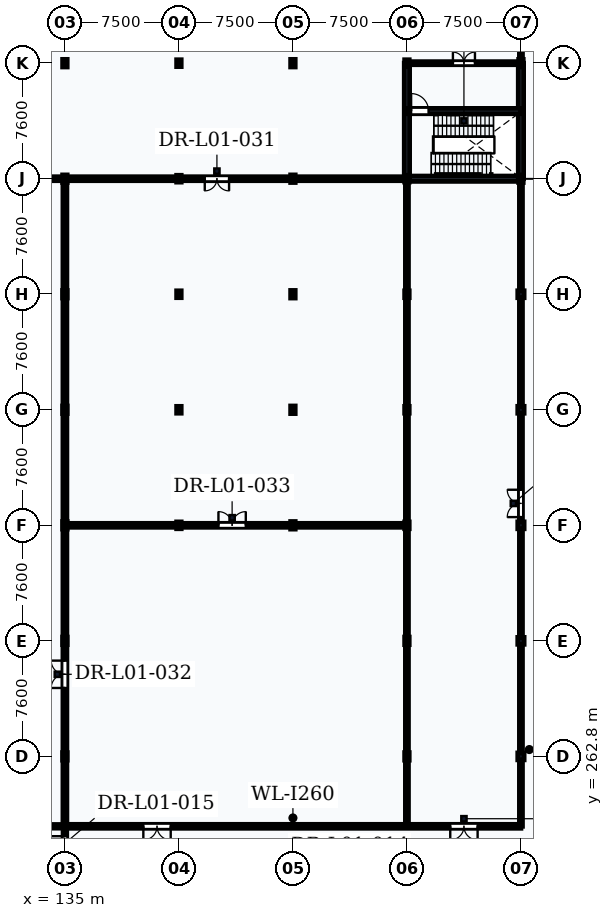
"""IFC4 building model, lengths in metres.
Left out: names, types, materials, properties, quantities, classifications, styles, units other than length and angle.
Written with IfcOpenShell. Run it as: python <this file> out.ifc"""

import sys

from ifc_helpers import new_model, si_unit, direction, frame, frame_2d, origin, origin_2d, place, context, subcontext, project, spatial, rectangle, i_section, extrude, element, fill, save


model = new_model("IFC4")
c1 = context("Model", 3, precision=1e-05, world=origin(), true_north=direction((0.0, 1.0)))
c2 = subcontext(c1, "Body", "Model", "MODEL_VIEW")
j1 = project(units=[si_unit("LENGTHUNIT", "METRE"), si_unit("PLANEANGLEUNIT", "RADIAN")], contexts=[c1])
p1 = place(None, origin())
s1 = spatial("IfcSite", under=j1, at=p1, CompositionType="ELEMENT")
p2 = place(p1, origin())
s2 = spatial("IfcBuilding", under=s1, at=p2, CompositionType="ELEMENT")
p3 = place(p2, origin())
s3 = spatial("IfcBuildingStorey", under=s2, at=p3, CompositionType="ELEMENT", Elevation=0.0)
for number, where, z_axis, x_axis in (
    (1, (135.0, 262.8, 0.0), (0.0, 0.0, 1.0), (1.0, 0.0, 0.0)),
    (2, (135.0, 270.4, 0.0), (0.0, 0.0, 1.0), (1.0, 0.0, 0.0)),
    (3, (135.0, 278.0, 0.0), (0.0, 0.0, 1.0), (1.0, 0.0, 0.0)),
    (4, (135.0, 285.6, 0.0), (0.0, 0.0, 1.0), (1.0, 0.0, 0.0)),
    (5, (135.0, 293.2, 0.0), (0.0, 0.0, 1.0), (1.0, 0.0, 0.0)),
    (6, (135.0, 300.8, 0.0), (0.0, 0.0, 1.0), (1.0, 0.0, 0.0)),
    (7, (135.0, 308.4, 0.0), (0.0, 0.0, 1.0), (1.0, 0.0, 0.0)),
):
    element("IfcColumn", number, at=place(p3, frame(where, z_axis=z_axis, x_axis=x_axis)), inside=s3, PredefinedType="COLUMN", context=c2, shape_type="SweptSolid", body=[
        extrude(i_section(OverallWidth=0.3, OverallDepth=0.5, WebThickness=0.014, FlangeThickness=0.028, FilletRadius=0.027, at=origin_2d()), origin(), (0.0, 0.0, 1.0), 5.4),
    ])
for number, where, z_axis, x_axis in (
    (8, (142.5, 278.0, 0.0), (0.0, 0.0, 1.0), (1.0, 0.0, 0.0)),
    (9, (142.5, 285.6, 0.0), (0.0, 0.0, 1.0), (1.0, 0.0, 0.0)),
    (10, (142.5, 293.2, 0.0), (0.0, 0.0, 1.0), (1.0, 0.0, 0.0)),
    (11, (142.5, 300.8, 0.0), (0.0, 0.0, 1.0), (1.0, 0.0, 0.0)),
    (12, (142.5, 308.4, 0.0), (0.0, 0.0, 1.0), (1.0, 0.0, 0.0)),
):
    element("IfcColumn", number, at=place(p3, frame(where, z_axis=z_axis, x_axis=x_axis)), inside=s3, PredefinedType="COLUMN", context=c2, shape_type="SweptSolid", body=[
        extrude(i_section(OverallWidth=0.3, OverallDepth=0.45, WebThickness=0.014, FlangeThickness=0.026, FilletRadius=0.027, at=origin_2d()), origin(), (0.0, 0.0, 1.0), 5.4),
    ])
for number, where, z_axis, x_axis in (
    (13, (150.0, 278.0, 0.0), (0.0, 0.0, 1.0), (1.0, 0.0, 0.0)),
    (14, (150.0, 285.6, 0.0), (0.0, 0.0, 1.0), (1.0, 0.0, 0.0)),
    (15, (150.0, 293.2, 0.0), (0.0, 0.0, 1.0), (1.0, 0.0, 0.0)),
    (16, (150.0, 300.8, 0.0), (0.0, 0.0, 1.0), (1.0, 0.0, 0.0)),
    (17, (150.0, 308.4, 0.0), (0.0, 0.0, 1.0), (1.0, 0.0, 0.0)),
    (18, (157.5, 262.8, 0.0), (0.0, 0.0, 1.0), (1.0, 0.0, 0.0)),
    (19, (157.5, 270.4, 0.0), (0.0, 0.0, 1.0), (1.0, 0.0, 0.0)),
):
    element("IfcColumn", number, at=place(p3, frame(where, z_axis=z_axis, x_axis=x_axis)), inside=s3, PredefinedType="COLUMN", context=c2, shape_type="SweptSolid", body=[
        extrude(i_section(OverallWidth=0.3, OverallDepth=0.5, WebThickness=0.014, FlangeThickness=0.028, FilletRadius=0.027, at=origin_2d()), origin(), (0.0, 0.0, 1.0), 5.4),
    ])
for number, where, z_axis, x_axis in (
    (20, (157.5, 278.0, 0.0), (0.0, 0.0, 1.0), (1.0, 0.0, 0.0)),
    (21, (157.5, 285.6, 0.0), (0.0, 0.0, 1.0), (1.0, 0.0, 0.0)),
    (22, (157.5, 293.2, 0.0), (0.0, 0.0, 1.0), (1.0, 0.0, 0.0)),
    (23, (157.5, 300.8, 0.0), (0.0, 0.0, 1.0), (1.0, 0.0, 0.0)),
    (24, (157.5, 308.4, 0.0), (0.0, 0.0, 1.0), (1.0, 0.0, 0.0)),
):
    element("IfcColumn", number, at=place(p3, frame(where, z_axis=z_axis, x_axis=x_axis)), inside=s3, PredefinedType="COLUMN", context=c2, shape_type="SweptSolid", body=[
        extrude(i_section(OverallWidth=0.3, OverallDepth=0.45, WebThickness=0.014, FlangeThickness=0.026, FilletRadius=0.027, at=origin_2d()), origin(), (0.0, 0.0, 1.0), 5.4),
    ])
for number, where, z_axis, x_axis in (
    (25, (165.0, 262.8, 0.0), (0.0, 0.0, 1.0), (1.0, 0.0, 0.0)),
    (26, (165.0, 270.4, 0.0), (0.0, 0.0, 1.0), (1.0, 0.0, 0.0)),
    (27, (165.0, 278.0, 0.0), (0.0, 0.0, 1.0), (1.0, 0.0, 0.0)),
    (28, (165.0, 285.6, 0.0), (0.0, 0.0, 1.0), (1.0, 0.0, 0.0)),
    (29, (165.0, 293.2, 0.0), (0.0, 0.0, 1.0), (1.0, 0.0, 0.0)),
):
    element("IfcColumn", number, at=place(p3, frame(where, z_axis=z_axis, x_axis=x_axis)), inside=s3, PredefinedType="COLUMN", context=c2, shape_type="SweptSolid", body=[
        extrude(i_section(OverallWidth=0.418, OverallDepth=0.455, WebThickness=0.042, FlangeThickness=0.068, FilletRadius=0.015, at=origin_2d()), origin(), (0.0, 0.0, 1.0), 5.4),
    ])
for number, where, z_axis, x_axis in (
    (30, (165.0, 300.8, 0.0), (0.0, 0.0, 1.0), (1.0, 0.0, 0.0)),
    (31, (165.0, 308.4, 0.0), (0.0, 0.0, 1.0), (1.0, 0.0, 0.0)),
):
    element("IfcColumn", number, at=place(p3, frame(where, z_axis=z_axis, x_axis=x_axis)), inside=s3, PredefinedType="COLUMN", context=c2, shape_type="SweptSolid", body=[
        extrude(i_section(OverallWidth=0.3, OverallDepth=0.5, WebThickness=0.014, FlangeThickness=0.028, FilletRadius=0.027, at=origin_2d()), origin(), (0.0, 0.0, 1.0), 5.4),
    ])
p4 = place(p3, frame((157.5, 300.8, 0.0), z_axis=(0.0, 0.0, 1.0), x_axis=(1.0, 0.0, 0.0)))
e32 = element("IfcWall", 32, at=p4, inside=s3, PredefinedType="SHEAR", context=c2, shape_type="SweptSolid", body=[
    extrude(rectangle(XDim=7.5, YDim=0.35, at=frame_2d((3.75, 0.0))), origin(), (0.0, 0.0, 1.0), 5.14),
])
for number, where, z_axis, x_axis in (
    (33, (157.5, 300.8, 0.0), (0.0, 0.0, 1.0), (0.0, 1.0, 0.0)),
    (34, (165.0, 300.8, 0.0), (0.0, 0.0, 1.0), (0.0, 1.0, 0.0)),
):
    element("IfcWall", number, at=place(p3, frame(where, z_axis=z_axis, x_axis=x_axis)), inside=s3, PredefinedType="SHEAR", context=c2, shape_type="SweptSolid", body=[
        extrude(rectangle(XDim=7.6, YDim=0.35, at=frame_2d((3.8, 0.0))), origin(), (0.0, 0.0, 1.0), 5.14),
    ])
p5 = place(p3, frame((157.5, 305.25, 0.0), z_axis=(0.0, 0.0, 1.0), x_axis=(1.0, 0.0, 0.0)))
e35 = element("IfcWall", 35, at=p5, inside=s3, PredefinedType="SHEAR", context=c2, shape_type="SweptSolid", body=[
    extrude(rectangle(XDim=7.5, YDim=0.35, at=frame_2d((3.75, 0.0))), origin(), (0.0, 0.0, 1.0), 5.14),
])
p6 = place(p5, frame((0.275, 0.0, 0.0)))
e36 = element("IfcOpeningElement", 36, at=p6, cuts=e35, PredefinedType="OPENING", context=c2, shape_type="SweptSolid", body=[
    extrude(rectangle(XDim=1.15, YDim=2.15, at=frame_2d((0.575, 1.075))), frame((0.0, 0.19, 0.0), z_axis=(0.0, -1.0, 0.0), x_axis=(1.0, 0.0, 0.0)), (0.0, 0.0, 1.0), 0.38),
])
p7 = place(p3, frame((157.5, 308.4, 0.0), z_axis=(0.0, 0.0, 1.0), x_axis=(1.0, 0.0, 0.0)))
e37 = element("IfcWall", 37, at=p7, inside=s3, PredefinedType="PARTITIONING", context=c2, shape_type="SweptSolid", body=[
    extrude(rectangle(XDim=7.5, YDim=0.2, at=frame_2d((3.75, 0.0))), origin(), (0.0, 0.0, 1.0), 4.778),
])
p8 = place(p7, frame((3.025, 0.0, 0.0)))
e38 = element("IfcOpeningElement", 38, at=p8, cuts=e37, PredefinedType="OPENING", context=c2, shape_type="SweptSolid", body=[
    extrude(rectangle(XDim=1.45, YDim=2.2, at=frame_2d((0.725, 1.1))), frame((0.0, 0.115, 0.0), z_axis=(0.0, -1.0, 0.0), x_axis=(1.0, 0.0, 0.0)), (0.0, 0.0, 1.0), 0.23),
])
p9 = place(p3, frame((135.0, 240.0, 0.0), z_axis=(0.0, 0.0, 1.0), x_axis=(0.0, 1.0, 0.0)))
e39 = element("IfcWall", 39, at=p9, inside=s3, PredefinedType="PARTITIONING", context=c2, shape_type="SweptSolid", body=[
    extrude(rectangle(XDim=18.2, YDim=0.24, at=frame_2d((9.1, 0.0))), origin(), (0.0, 0.0, 1.0), 4.688),
])
p10 = place(p9, frame((15.75, 0.0, 0.0)))
e40 = element("IfcOpeningElement", 40, at=p10, cuts=e39, PredefinedType="OPENING", context=c2, shape_type="SweptSolid", body=[
    extrude(rectangle(XDim=1.8, YDim=2.25, at=frame_2d((0.9, 1.125))), frame((0.0, 0.135, 0.0), z_axis=(0.0, -1.0, 0.0), x_axis=(1.0, 0.0, 0.0)), (0.0, 0.0, 1.0), 0.27),
])
p11 = place(p3, frame((120.0, 258.2, 0.0), z_axis=(0.0, 0.0, 1.0), x_axis=(1.0, 0.0, 0.0)))
e41 = element("IfcWall", 41, at=p11, inside=s3, PredefinedType="PARTITIONING", context=c2, shape_type="SweptSolid", body=[
    extrude(rectangle(XDim=15.0, YDim=0.24, at=frame_2d((7.5, 0.0))), origin(), (0.0, 0.0, 1.0), 5.14),
])
p12 = place(p3, frame((135.0, 258.2, 0.0), z_axis=(0.0, 0.0, 1.0), x_axis=(1.0, 0.0, 0.0)))
e42 = element("IfcWall", 42, at=p12, inside=s3, PredefinedType="PARTITIONING", context=c2, shape_type="SweptSolid", body=[
    extrude(rectangle(XDim=30.0, YDim=0.26, at=frame_2d((15.0, 0.0))), origin(), (0.0, 0.0, 1.0), 5.14),
])
p13 = place(p12, frame((5.16, 0.0, 0.0)))
e43 = element("IfcOpeningElement", 43, at=p13, cuts=e42, PredefinedType="OPENING", context=c2, shape_type="SweptSolid", body=[
    extrude(rectangle(XDim=1.8, YDim=2.4, at=frame_2d((0.9, 1.2))), frame((0.0, 0.145, 0.0), z_axis=(0.0, -1.0, 0.0), x_axis=(1.0, 0.0, 0.0)), (0.0, 0.0, 1.0), 0.29),
])
p14 = place(p12, frame((25.35, 0.0, 0.0)))
e44 = element("IfcOpeningElement", 44, at=p14, cuts=e42, PredefinedType="OPENING", context=c2, shape_type="SweptSolid", body=[
    extrude(rectangle(XDim=1.8, YDim=2.4, at=frame_2d((0.9, 1.2))), frame((0.0, 0.145, 0.0), z_axis=(0.0, -1.0, 0.0), x_axis=(1.0, 0.0, 0.0)), (0.0, 0.0, 1.0), 0.29),
])
p15 = place(p3, frame((157.5, 258.2, 0.0), z_axis=(0.0, 0.0, 1.0), x_axis=(0.0, 1.0, 0.0)))
e45 = element("IfcWall", 45, at=p15, inside=s3, PredefinedType="PARTITIONING", context=c2, shape_type="SweptSolid", body=[
    extrude(rectangle(XDim=42.6, YDim=0.2, at=frame_2d((21.3, 0.0))), origin(), (0.0, 0.0, 1.0), 4.778),
])
p16 = place(p3, frame((165.0, 258.2, 0.0), z_axis=(0.0, 0.0, 1.0), x_axis=(0.0, 1.0, 0.0)))
e46 = element("IfcWall", 46, at=p16, inside=s3, PredefinedType="PARTITIONING", context=c2, shape_type="SweptSolid", body=[
    extrude(rectangle(XDim=42.6, YDim=0.2, at=frame_2d((21.3, 0.0))), origin(), (0.0, 0.0, 1.0), 4.738),
])
p17 = place(p16, frame((20.34, 0.0, 0.0)))
e47 = element("IfcOpeningElement", 47, at=p17, cuts=e46, PredefinedType="OPENING", context=c2, shape_type="SweptSolid", body=[
    extrude(rectangle(XDim=1.8, YDim=2.4, at=frame_2d((0.9, 1.2))), frame((0.0, 0.115, 0.0), z_axis=(0.0, -1.0, 0.0), x_axis=(1.0, 0.0, 0.0)), (0.0, 0.0, 1.0), 0.23),
])
p18 = place(p3, frame((165.0, 308.4, 0.0), z_axis=(0.0, 0.0, 1.0), x_axis=(0.0, 1.0, 0.0)))
e48 = element("IfcWall", 48, at=p18, inside=s3, PredefinedType="PARTITIONING", context=c2, shape_type="SweptSolid", body=[
    extrude(rectangle(XDim=37.2, YDim=0.2, at=frame_2d((18.6, 0.0))), origin(), (0.0, 0.0, 1.0), 4.778),
])
p19 = place(p18, frame((12.86, 0.0, 0.0)))
e49 = element("IfcOpeningElement", 49, at=p19, cuts=e48, PredefinedType="OPENING", context=c2, shape_type="SweptSolid", body=[
    extrude(rectangle(XDim=1.8, YDim=2.4, at=frame_2d((0.9, 1.2))), frame((0.0, 0.115, 0.0), z_axis=(0.0, -1.0, 0.0), x_axis=(1.0, 0.0, 0.0)), (0.0, 0.0, 1.0), 0.23),
])
p20 = place(p3, frame((120.0, 300.8, 0.0), z_axis=(0.0, 0.0, 1.0), x_axis=(1.0, 0.0, 0.0)))
e50 = element("IfcWall", 50, at=p20, inside=s3, PredefinedType="PARTITIONING", context=c2, shape_type="SweptSolid", body=[
    extrude(rectangle(XDim=37.5, YDim=0.26, at=frame_2d((18.75, 0.0))), origin(), (0.0, 0.0, 1.0), 4.788),
])
p21 = place(p20, frame((24.2, 0.0, 0.0)))
e51 = element("IfcOpeningElement", 51, at=p21, cuts=e50, PredefinedType="OPENING", context=c2, shape_type="SweptSolid", body=[
    extrude(rectangle(XDim=1.6, YDim=2.25, at=frame_2d((0.8, 1.125))), frame((0.0, 0.145, 0.0), z_axis=(0.0, -1.0, 0.0), x_axis=(1.0, 0.0, 0.0)), (0.0, 0.0, 1.0), 0.29),
])
p22 = place(p3, frame((135.0, 258.2, 0.0), z_axis=(0.0, 0.0, 1.0), x_axis=(0.0, 1.0, 0.0)))
e52 = element("IfcWall", 52, at=p22, inside=s3, PredefinedType="PARTITIONING", context=c2, shape_type="SweptSolid", body=[
    extrude(rectangle(XDim=42.6, YDim=0.26, at=frame_2d((21.3, 0.0))), origin(), (0.0, 0.0, 1.0), 4.778),
])
p23 = place(p22, frame((9.1, 0.0, 0.0)))
e53 = element("IfcOpeningElement", 53, at=p23, cuts=e52, PredefinedType="OPENING", context=c2, shape_type="SweptSolid", body=[
    extrude(rectangle(XDim=1.8, YDim=2.4, at=frame_2d((0.9, 1.2))), frame((0.0, 0.145, 0.0), z_axis=(0.0, -1.0, 0.0), x_axis=(1.0, 0.0, 0.0)), (0.0, 0.0, 1.0), 0.29),
])
p24 = place(p3, frame((135.0, 278.0, 0.0), z_axis=(0.0, 0.0, 1.0), x_axis=(1.0, 0.0, 0.0)))
e54 = element("IfcWall", 54, at=p24, inside=s3, PredefinedType="PARTITIONING", context=c2, shape_type="SweptSolid", body=[
    extrude(rectangle(XDim=22.5, YDim=0.26, at=frame_2d((11.25, 0.0))), origin(), (0.0, 0.0, 1.0), 4.778),
])
p25 = place(p24, frame((10.1, 0.0, 0.0)))
e55 = element("IfcOpeningElement", 55, at=p25, cuts=e54, PredefinedType="OPENING", context=c2, shape_type="SweptSolid", body=[
    extrude(rectangle(XDim=1.8, YDim=2.4, at=frame_2d((0.9, 1.2))), frame((0.0, 0.145, 0.0), z_axis=(0.0, -1.0, 0.0), x_axis=(1.0, 0.0, 0.0)), (0.0, 0.0, 1.0), 0.29),
])
p26 = place(p6, origin())
e56 = element("IfcDoor", 56, at=p26, inside=s3, OperationType="SINGLE_SWING_LEFT", PredefinedType="DOOR", context=c2, shape_type="SweptSolid", body=[
    extrude(rectangle(XDim=1.15, YDim=2.15, at=frame_2d((0.575, 1.075))), frame((0.0, 0.025, 0.0), z_axis=(0.0, -1.0, 0.0), x_axis=(1.0, 0.0, 0.0)), (0.0, 0.0, 1.0), 0.05),
])
fill(e36, e56)
p27 = place(p8, origin())
e57 = element("IfcDoor", 57, at=p27, inside=s3, OperationType="DOUBLE_DOOR_SINGLE_SWING", PredefinedType="DOOR", context=c2, shape_type="SweptSolid", body=[
    extrude(rectangle(XDim=1.45, YDim=2.2, at=frame_2d((0.725, 1.1))), frame((0.0, 0.025, 0.0), z_axis=(0.0, -1.0, 0.0), x_axis=(1.0, 0.0, 0.0)), (0.0, 0.0, 1.0), 0.05),
])
fill(e38, e57)
p28 = place(p10, origin())
e58 = element("IfcDoor", 58, at=p28, inside=s3, OperationType="DOUBLE_DOOR_SINGLE_SWING", PredefinedType="DOOR", context=c2, shape_type="SweptSolid", body=[
    extrude(rectangle(XDim=1.8, YDim=2.25, at=frame_2d((0.9, 1.125))), frame((0.0, 0.025, 0.0), z_axis=(0.0, -1.0, 0.0), x_axis=(1.0, 0.0, 0.0)), (0.0, 0.0, 1.0), 0.05),
])
fill(e40, e58)
p29 = place(p13, frame((1.8, 0.0, 0.0), z_axis=(0.0, 0.0, 1.0), x_axis=(-1.0, 0.0, 0.0)))
e59 = element("IfcDoor", 59, at=p29, inside=s3, OperationType="DOUBLE_DOOR_SINGLE_SWING", PredefinedType="DOOR", context=c2, shape_type="SweptSolid", body=[
    extrude(rectangle(XDim=1.8, YDim=2.4, at=frame_2d((0.9, 1.2))), frame((0.0, 0.025, 0.0), z_axis=(0.0, -1.0, 0.0), x_axis=(1.0, 0.0, 0.0)), (0.0, 0.0, 1.0), 0.05),
])
fill(e43, e59)
p30 = place(p14, frame((1.8, 0.0, 0.0), z_axis=(0.0, 0.0, 1.0), x_axis=(-1.0, 0.0, 0.0)))
e60 = element("IfcDoor", 60, at=p30, inside=s3, OperationType="DOUBLE_DOOR_SINGLE_SWING", PredefinedType="DOOR", context=c2, shape_type="SweptSolid", body=[
    extrude(rectangle(XDim=1.8, YDim=2.4, at=frame_2d((0.9, 1.2))), frame((0.0, 0.025, 0.0), z_axis=(0.0, -1.0, 0.0), x_axis=(1.0, 0.0, 0.0)), (0.0, 0.0, 1.0), 0.05),
])
fill(e44, e60)
p31 = place(p17, origin())
e61 = element("IfcDoor", 61, at=p31, inside=s3, OperationType="DOUBLE_DOOR_SINGLE_SWING", PredefinedType="DOOR", context=c2, shape_type="SweptSolid", body=[
    extrude(rectangle(XDim=1.8, YDim=2.4, at=frame_2d((0.9, 1.2))), frame((0.0, 0.025, 0.0), z_axis=(0.0, -1.0, 0.0), x_axis=(1.0, 0.0, 0.0)), (0.0, 0.0, 1.0), 0.05),
])
fill(e47, e61)
p32 = place(p21, frame((1.6, 0.0, 0.0), z_axis=(0.0, 0.0, 1.0), x_axis=(-1.0, 0.0, 0.0)))
e62 = element("IfcDoor", 62, at=p32, inside=s3, OperationType="DOUBLE_DOOR_SINGLE_SWING", PredefinedType="DOOR", context=c2, shape_type="SweptSolid", body=[
    extrude(rectangle(XDim=1.6, YDim=2.25, at=frame_2d((0.8, 1.125))), frame((0.0, 0.025, 0.0), z_axis=(0.0, -1.0, 0.0), x_axis=(1.0, 0.0, 0.0)), (0.0, 0.0, 1.0), 0.05),
])
fill(e51, e62)
p33 = place(p23, origin())
e63 = element("IfcDoor", 63, at=p33, inside=s3, OperationType="DOUBLE_DOOR_SINGLE_SWING", PredefinedType="DOOR", context=c2, shape_type="SweptSolid", body=[
    extrude(rectangle(XDim=1.8, YDim=2.4, at=frame_2d((0.9, 1.2))), frame((0.0, 0.025, 0.0), z_axis=(0.0, -1.0, 0.0), x_axis=(1.0, 0.0, 0.0)), (0.0, 0.0, 1.0), 0.05),
])
fill(e53, e63)
p34 = place(p25, origin())
e64 = element("IfcDoor", 64, at=p34, inside=s3, OperationType="DOUBLE_DOOR_SINGLE_SWING", PredefinedType="DOOR", context=c2, shape_type="SweptSolid", body=[
    extrude(rectangle(XDim=1.8, YDim=2.4, at=frame_2d((0.9, 1.2))), frame((0.0, 0.025, 0.0), z_axis=(0.0, -1.0, 0.0), x_axis=(1.0, 0.0, 0.0)), (0.0, 0.0, 1.0), 0.05),
])
fill(e55, e64)
save(model, sys.argv[1])
